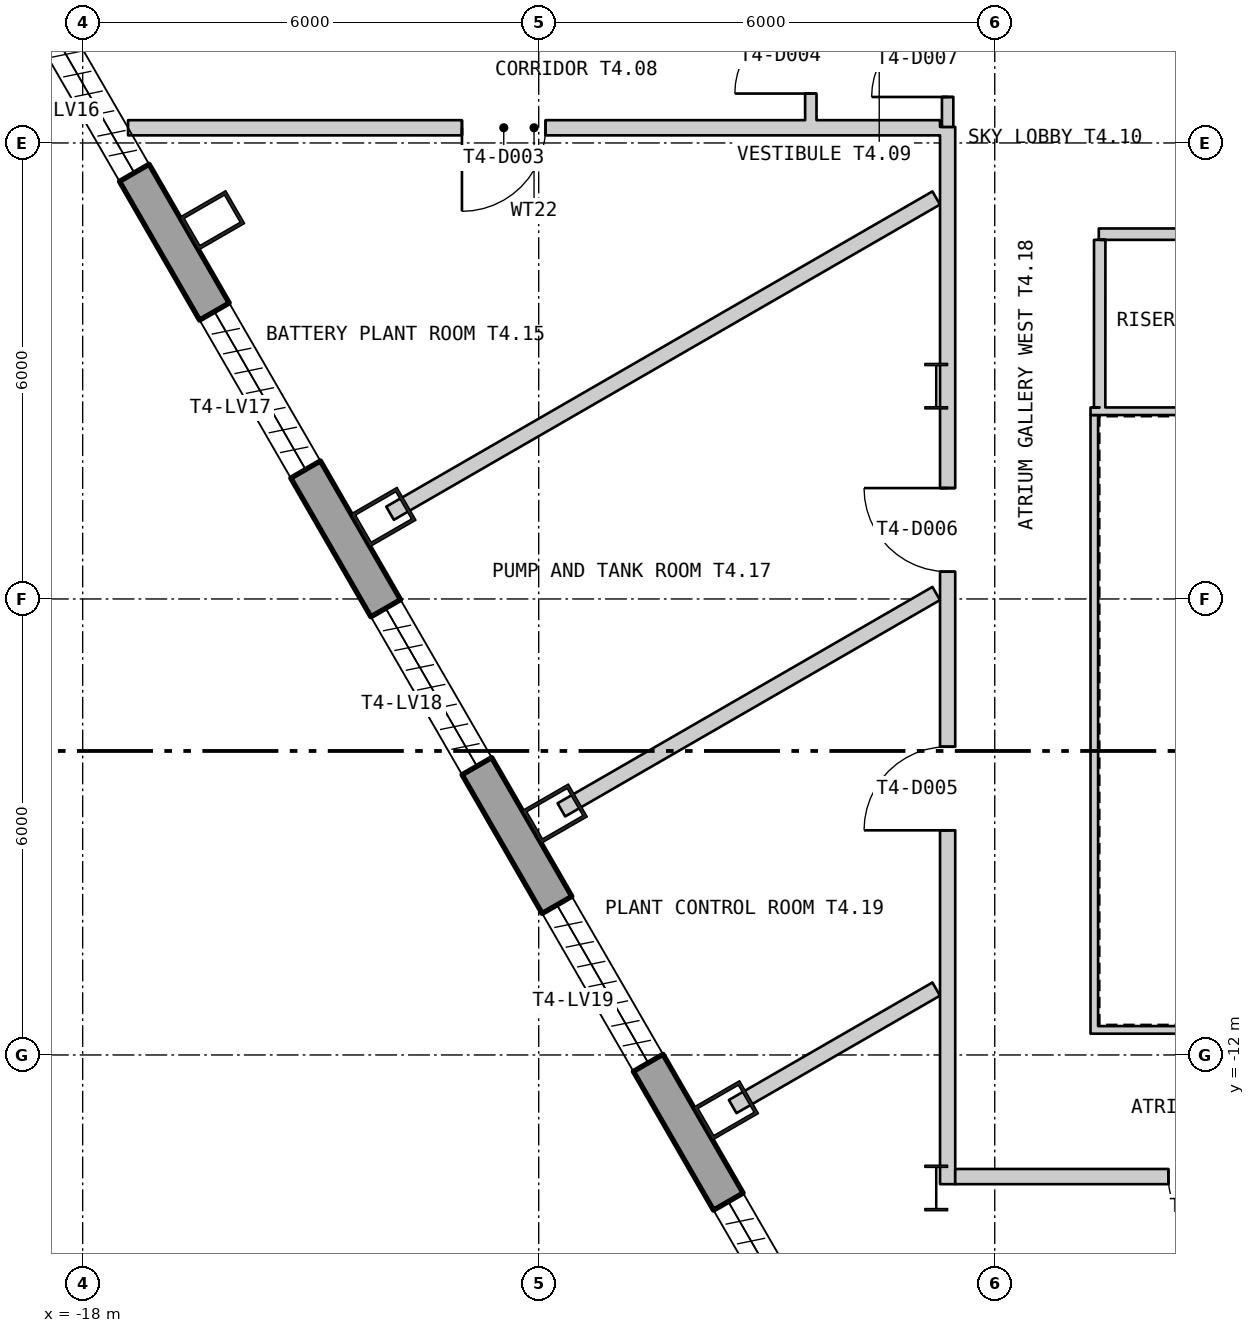
"""IFC4 building model, lengths in metres.
Left out: names, types, materials, properties, quantities, classifications, styles, units other than length and angle.
Written with IfcOpenShell. Run it as: python <this file> out.ifc"""

import sys

from ifc_helpers import new_model, si_unit, direction, frame, frame_2d, origin, origin_2d, place, context, subcontext, project, spatial, polyline, rectangle, hollow_rectangle, i_section, outline, extrude, element, fill, save


model = new_model("IFC4")
c1 = context("Model", 3, precision=1e-05, world=origin(), true_north=direction((0.0, 1.0)))
c2 = subcontext(c1, "Body", "Model", "MODEL_VIEW")
j1 = project(units=[si_unit("LENGTHUNIT", "METRE"), si_unit("PLANEANGLEUNIT", "RADIAN")], contexts=[c1])
p1 = place(None, origin())
s1 = spatial("IfcSite", under=j1, at=p1, CompositionType="ELEMENT")
p2 = place(p1, origin())
s2 = spatial("IfcBuilding", under=s1, at=p2, CompositionType="ELEMENT")
p3 = place(p2, frame((0.0, 0.0, 239.4)))
s3 = spatial("IfcBuildingStorey", under=s2, at=p3, CompositionType="ELEMENT", Elevation=239.4)
for number, where, z_axis, x_axis in (
    (1, (-16.296, -1.018, 0.0), (0.0, 0.0, 1.0), (0.5, -0.866, 0.0)),
    (2, (-14.042, -4.922, 0.0), (0.0, 0.0, 1.0), (0.5, -0.866, 0.0)),
    (3, (-11.788, -8.825, 0.0), (0.0, 0.0, 1.0), (0.5, -0.866, 0.0)),
    (4, (-9.535, -12.729, 0.0), (0.0, 0.0, 1.0), (0.5, -0.866, 0.0)),
):
    element("IfcColumn", number, at=place(p3, frame(where, z_axis=z_axis, x_axis=x_axis)), inside=s3, PredefinedType="COLUMN", context=c2, shape_type="SweptSolid", body=[
        extrude(hollow_rectangle(XDim=0.5, YDim=0.7, WallThickness=0.045, at=origin_2d()), origin(), (0.0, 0.0, 1.0), 6.0),
    ])
for number, where, z_axis, x_axis in (
    (5, (-6.77, -3.2, 0.0), (0.0, 0.0, 1.0), (1.0, 0.0, 0.0)),
    (6, (-6.77, -13.75, 0.0), (0.0, 0.0, 1.0), (1.0, 0.0, 0.0)),
):
    element("IfcColumn", number, at=place(p3, frame(where, z_axis=z_axis, x_axis=x_axis)), inside=s3, PredefinedType="COLUMN", context=c2, shape_type="SweptSolid", body=[
        extrude(i_section(OverallWidth=0.3, OverallDepth=0.6, WebThickness=0.015, FlangeThickness=0.03, at=origin_2d()), origin(), (0.0, 0.0, 1.0), 6.0),
    ])
p4 = place(p3, frame((-25.975, 14.597, -0.18), z_axis=(0.0, 0.0, 1.0), x_axis=(0.499999764979, -0.866025539474, 0.0)))
e7 = element("IfcWall", 7, at=p4, inside=s3, PredefinedType="SOLIDWALL", context=c2, shape_type="SweptSolid", body=[
    extrude(outline(polyline([(-0.13, -0.225), (45.87, -0.225), (45.61, 0.225), (0.13, 0.225), (-0.13, -0.225)])), origin(), (0.0, 0.0, 1.0), 6.0),
])
p5 = place(p4, frame((1.424, 0.0, 1.38)))
e8 = element("IfcOpeningElement", 8, at=p5, cuts=e7, PredefinedType="OPENING", context=c2, shape_type="SweptSolid", body=[
    extrude(rectangle(XDim=2.4, YDim=3.6, at=frame_2d((1.2, 1.8))), frame((0.0, 0.235, 0.0), z_axis=(0.0, -1.0, 0.0), x_axis=(1.0, 0.0, 0.0)), (0.0, 0.0, 1.0), 0.47),
])
p6 = place(p4, frame((5.893, 0.0, 1.38)))
e9 = element("IfcOpeningElement", 9, at=p6, cuts=e7, PredefinedType="OPENING", context=c2, shape_type="SweptSolid", body=[
    extrude(rectangle(XDim=2.4, YDim=3.6, at=frame_2d((1.2, 1.8))), frame((0.0, 0.235, 0.0), z_axis=(0.0, -1.0, 0.0), x_axis=(1.0, 0.0, 0.0)), (0.0, 0.0, 1.0), 0.47),
])
p7 = place(p4, frame((10.401, 0.0, 1.38)))
e10 = element("IfcOpeningElement", 10, at=p7, cuts=e7, PredefinedType="OPENING", context=c2, shape_type="SweptSolid", body=[
    extrude(rectangle(XDim=2.4, YDim=3.6, at=frame_2d((1.2, 1.8))), frame((0.0, 0.235, 0.0), z_axis=(0.0, -1.0, 0.0), x_axis=(1.0, 0.0, 0.0)), (0.0, 0.0, 1.0), 0.47),
])
p8 = place(p4, frame((14.909, 0.0, 1.38)))
e11 = element("IfcOpeningElement", 11, at=p8, cuts=e7, PredefinedType="OPENING", context=c2, shape_type="SweptSolid", body=[
    extrude(rectangle(XDim=2.4, YDim=3.6, at=frame_2d((1.2, 1.8))), frame((0.0, 0.235, 0.0), z_axis=(0.0, -1.0, 0.0), x_axis=(1.0, 0.0, 0.0)), (0.0, 0.0, 1.0), 0.47),
])
p9 = place(p4, frame((19.416, 0.0, 1.38)))
e12 = element("IfcOpeningElement", 12, at=p9, cuts=e7, PredefinedType="OPENING", context=c2, shape_type="SweptSolid", body=[
    extrude(rectangle(XDim=2.4, YDim=3.6, at=frame_2d((1.2, 1.8))), frame((0.0, 0.235, 0.0), z_axis=(0.0, -1.0, 0.0), x_axis=(1.0, 0.0, 0.0)), (0.0, 0.0, 1.0), 0.47),
])
p10 = place(p4, frame((23.924, 0.0, 1.38)))
e13 = element("IfcOpeningElement", 13, at=p10, cuts=e7, PredefinedType="OPENING", context=c2, shape_type="SweptSolid", body=[
    extrude(rectangle(XDim=2.4, YDim=3.6, at=frame_2d((1.2, 1.8))), frame((0.0, 0.235, 0.0), z_axis=(0.0, -1.0, 0.0), x_axis=(1.0, 0.0, 0.0)), (0.0, 0.0, 1.0), 0.47),
])
p11 = place(p4, frame((28.431, 0.0, 1.38)))
e14 = element("IfcOpeningElement", 14, at=p11, cuts=e7, PredefinedType="OPENING", context=c2, shape_type="SweptSolid", body=[
    extrude(rectangle(XDim=2.4, YDim=3.6, at=frame_2d((1.2, 1.8))), frame((0.0, 0.235, 0.0), z_axis=(0.0, -1.0, 0.0), x_axis=(1.0, 0.0, 0.0)), (0.0, 0.0, 1.0), 0.47),
])
p12 = place(p4, frame((32.939, 0.0, 1.38)))
e15 = element("IfcOpeningElement", 15, at=p12, cuts=e7, PredefinedType="OPENING", context=c2, shape_type="SweptSolid", body=[
    extrude(rectangle(XDim=2.4, YDim=3.6, at=frame_2d((1.2, 1.8))), frame((0.0, 0.235, 0.0), z_axis=(0.0, -1.0, 0.0), x_axis=(1.0, 0.0, 0.0)), (0.0, 0.0, 1.0), 0.47),
])
p13 = place(p4, frame((37.447, 0.0, 1.38)))
e16 = element("IfcOpeningElement", 16, at=p13, cuts=e7, PredefinedType="OPENING", context=c2, shape_type="SweptSolid", body=[
    extrude(rectangle(XDim=2.4, YDim=3.6, at=frame_2d((1.2, 1.8))), frame((0.0, 0.235, 0.0), z_axis=(0.0, -1.0, 0.0), x_axis=(1.0, 0.0, 0.0)), (0.0, 0.0, 1.0), 0.47),
])
p14 = place(p4, frame((41.916, 0.0, 1.38)))
e17 = element("IfcOpeningElement", 17, at=p14, cuts=e7, PredefinedType="OPENING", context=c2, shape_type="SweptSolid", body=[
    extrude(rectangle(XDim=2.4, YDim=3.6, at=frame_2d((1.2, 1.8))), frame((0.0, 0.235, 0.0), z_axis=(0.0, -1.0, 0.0), x_axis=(1.0, 0.0, 0.0)), (0.0, 0.0, 1.0), 0.47),
])
for number, where, z_axis, x_axis in (
    (18, (-4.74, -11.67, 0.0), (0.0, 0.0, 1.0), (1.0, 0.0, 0.0)),
    (19, (4.74, -3.53, 0.0), (0.0, 0.0, 1.0), (-1.0, 0.0, 0.0)),
):
    element("IfcWall", number, at=place(p3, frame(where, z_axis=z_axis, x_axis=x_axis)), inside=s3, PredefinedType="PARTITIONING", context=c2, shape_type="SweptSolid", body=[
        extrude(rectangle(XDim=9.48, YDim=0.1, at=frame_2d((4.74, 0.0))), origin(), (0.0, 0.0, 1.0), 5.8),
    ])
p15 = place(p3, frame((-4.69, -3.58, 0.0), z_axis=(0.0, 0.0, 1.0), x_axis=(0.0, -1.0, 0.0)))
e20 = element("IfcWall", 20, at=p15, inside=s3, PredefinedType="PARTITIONING", context=c2, shape_type="SweptSolid", body=[
    extrude(rectangle(XDim=8.04, YDim=0.1, at=frame_2d((4.02, 0.0))), origin(), (0.0, 0.0, 1.0), 5.8),
])
p16 = place(p3, frame((-17.403, 0.2, 0.0), z_axis=(0.0, 0.0, 1.0), x_axis=(1.0, 0.0, 0.0)))
e21 = element("IfcWall", 21, at=p16, inside=s3, PredefinedType="PARTITIONING", context=c2, shape_type="SweptSolid", body=[
    extrude(rectangle(XDim=10.683, YDim=0.2, at=frame_2d((5.341, 0.0))), origin(), (0.0, 0.0, 1.0), 5.8),
])
p17 = place(p16, frame((4.393, 0.0, 0.0)))
e22 = element("IfcOpeningElement", 22, at=p17, cuts=e21, PredefinedType="OPENING", context=c2, shape_type="SweptSolid", body=[
    extrude(rectangle(XDim=1.1, YDim=2.1, at=frame_2d((0.55, 1.05))), frame((0.0, 0.11, 0.0), z_axis=(0.0, -1.0, 0.0), x_axis=(1.0, 0.0, 0.0)), (0.0, 0.0, 1.0), 0.22),
])
p18 = place(p3, frame((-13.956, -4.872, 0.0), z_axis=(0.0, 0.0, 1.0), x_axis=(0.866069187523, 0.499924156672, 0.0)))
e23 = element("IfcWall", 23, at=p18, inside=s3, PredefinedType="PARTITIONING", context=c2, shape_type="SweptSolid", body=[
    extrude(rectangle(XDim=8.297, YDim=0.2, at=frame_2d((4.149, 0.0))), origin(), (0.0, 0.0, 1.0), 5.8),
])
p19 = place(p3, frame((-11.702, -8.775, 0.0), z_axis=(0.0, 0.0, 1.0), x_axis=(0.866062775822, 0.499935264145, 0.0)))
e24 = element("IfcWall", 24, at=p19, inside=s3, PredefinedType="PARTITIONING", context=c2, shape_type="SweptSolid", body=[
    extrude(rectangle(XDim=5.695, YDim=0.2, at=frame_2d((2.847, 0.0))), origin(), (0.0, 0.0, 1.0), 5.8),
])
p20 = place(p3, frame((-9.448, -12.679, 0.0), z_axis=(0.0, 0.0, 1.0), x_axis=(0.866045570776, 0.499965068118, 0.0)))
e25 = element("IfcWall", 25, at=p20, inside=s3, PredefinedType="PARTITIONING", context=c2, shape_type="SweptSolid", body=[
    extrude(rectangle(XDim=3.092, YDim=0.2, at=frame_2d((1.546, 0.0))), origin(), (0.0, 0.0, 1.0), 5.8),
])
p21 = place(p3, frame((-8.42, 0.3, 0.0), z_axis=(0.0, 0.0, 1.0), x_axis=(0.0, 1.0, 0.0)))
e26 = element("IfcWall", 26, at=p21, inside=s3, PredefinedType="PARTITIONING", context=c2, shape_type="SweptSolid", body=[
    extrude(rectangle(XDim=1.7, YDim=0.15, at=frame_2d((0.85, 0.0))), origin(), (0.0, 0.0, 1.0), 5.8),
])
p22 = place(p21, frame((0.35, 0.0, 0.0)))
e27 = element("IfcOpeningElement", 27, at=p22, cuts=e26, PredefinedType="OPENING", context=c2, shape_type="SweptSolid", body=[
    extrude(rectangle(XDim=1.0, YDim=2.1, at=frame_2d((0.5, 1.05))), frame((0.0, 0.085, 0.0), z_axis=(0.0, -1.0, 0.0), x_axis=(1.0, 0.0, 0.0)), (0.0, 0.0, 1.0), 0.17),
])
p23 = place(p3, frame((-6.62, -13.7, 0.0), z_axis=(0.0, 0.0, 1.0), x_axis=(0.0, 1.0, 0.0)))
e28 = element("IfcWall", 28, at=p23, inside=s3, PredefinedType="PARTITIONING", context=c2, shape_type="SweptSolid", body=[
    extrude(rectangle(XDim=10.5, YDim=0.2, at=frame_2d((5.25, 0.0))), origin(), (0.0, 0.0, 1.0), 5.21),
])
p24 = place(p23, frame((4.656, 0.0, 0.0)))
e29 = element("IfcOpeningElement", 29, at=p24, cuts=e28, PredefinedType="OPENING", context=c2, shape_type="SweptSolid", body=[
    extrude(rectangle(XDim=1.1, YDim=2.1, at=frame_2d((0.55, 1.05))), frame((0.0, 0.11, 0.0), z_axis=(0.0, -1.0, 0.0), x_axis=(1.0, 0.0, 0.0)), (0.0, 0.0, 1.0), 0.22),
])
p25 = place(p23, frame((8.059, 0.0, 0.0)))
e30 = element("IfcOpeningElement", 30, at=p25, cuts=e28, PredefinedType="OPENING", context=c2, shape_type="SweptSolid", body=[
    extrude(rectangle(XDim=1.1, YDim=2.1, at=frame_2d((0.55, 1.05))), frame((0.0, 0.11, 0.0), z_axis=(0.0, -1.0, 0.0), x_axis=(1.0, 0.0, 0.0)), (0.0, 0.0, 1.0), 0.22),
])
p26 = place(p3, frame((-6.62, -3.2, 0.0), z_axis=(0.0, 0.0, 1.0), x_axis=(0.0, 1.0, 0.0)))
e31 = element("IfcWall", 31, at=p26, inside=s3, PredefinedType="PARTITIONING", context=c2, shape_type="SweptSolid", body=[
    extrude(rectangle(XDim=3.411, YDim=0.2, at=frame_2d((1.706, 0.0))), origin(), (0.0, 0.0, 1.0), 5.8),
])
p27 = place(p3, frame((-6.62, 0.211, 0.0), z_axis=(0.0, 0.0, 1.0), x_axis=(0.0, 1.0, 0.0)))
e32 = element("IfcWall", 32, at=p27, inside=s3, PredefinedType="PARTITIONING", context=c2, shape_type="SweptSolid", body=[
    extrude(rectangle(XDim=1.789, YDim=0.15, at=frame_2d((0.894, 0.0))), origin(), (0.0, 0.0, 1.0), 5.8),
])
p28 = place(p27, frame((0.394, 0.0, 0.0)))
e33 = element("IfcOpeningElement", 33, at=p28, cuts=e32, PredefinedType="OPENING", context=c2, shape_type="SweptSolid", body=[
    extrude(rectangle(XDim=1.0, YDim=2.1, at=frame_2d((0.5, 1.05))), frame((0.0, 0.085, 0.0), z_axis=(0.0, -1.0, 0.0), x_axis=(1.0, 0.0, 0.0)), (0.0, 0.0, 1.0), 0.17),
])
p29 = place(p3, frame((-6.52, -13.6, 0.0), z_axis=(0.0, 0.0, 1.0), x_axis=(1.0, 0.0, 0.0)))
e34 = element("IfcWall", 34, at=p29, inside=s3, PredefinedType="PARTITIONING", context=c2, shape_type="SweptSolid", body=[
    extrude(rectangle(XDim=4.82, YDim=0.2, at=frame_2d((2.41, 0.0))), origin(), (0.0, 0.0, 1.0), 5.01),
])
p30 = place(p29, frame((2.804, 0.0, 0.0)))
e35 = element("IfcOpeningElement", 35, at=p30, cuts=e34, PredefinedType="OPENING", context=c2, shape_type="SweptSolid", body=[
    extrude(rectangle(XDim=1.1, YDim=2.1, at=frame_2d((0.55, 1.05))), frame((0.0, 0.11, 0.0), z_axis=(0.0, -1.0, 0.0), x_axis=(1.0, 0.0, 0.0)), (0.0, 0.0, 1.0), 0.22),
])
p31 = place(p3, frame((-4.631, -1.2, 0.0), z_axis=(0.0, 0.0, 1.0), x_axis=(1.0, 0.0, 0.0)))
e36 = element("IfcWall", 36, at=p31, inside=s3, PredefinedType="PARTITIONING", context=c2, shape_type="SweptSolid", body=[
    extrude(rectangle(XDim=4.62, YDim=0.15, at=frame_2d((2.31, 0.0))), origin(), (0.0, 0.0, 1.0), 5.8),
])
p32 = place(p31, frame((2.583, 0.0, 0.0)))
e37 = element("IfcOpeningElement", 37, at=p32, cuts=e36, PredefinedType="OPENING", context=c2, shape_type="SweptSolid", body=[
    extrude(rectangle(XDim=0.9, YDim=2.1, at=frame_2d((0.45, 1.05))), frame((0.0, 0.085, 0.0), z_axis=(0.0, -1.0, 0.0), x_axis=(1.0, 0.0, 0.0)), (0.0, 0.0, 1.0), 0.17),
])
p33 = place(p3, frame((-4.62, -3.48, 0.0), z_axis=(0.0, 0.0, 1.0), x_axis=(0.000453514693, 0.999999897162, 0.0)))
e38 = element("IfcWall", 38, at=p33, inside=s3, PredefinedType="PARTITIONING", context=c2, shape_type="SweptSolid", body=[
    extrude(rectangle(XDim=2.205, YDim=0.15, at=frame_2d((1.103, 0.0))), origin(), (0.0, 0.0, 1.0), 5.8),
])
p34 = place(p17, origin())
e39 = element("IfcDoor", 39, at=p34, inside=s3, OperationType="SINGLE_SWING_LEFT", PredefinedType="DOOR", context=c2, shape_type="SweptSolid", body=[
    extrude(rectangle(XDim=1.1, YDim=2.1, at=frame_2d((0.55, 1.05))), frame((0.0, 0.025, 0.0), z_axis=(0.0, -1.0, 0.0), x_axis=(1.0, 0.0, 0.0)), (0.0, 0.0, 1.0), 0.05),
])
fill(e22, e39)
p35 = place(p22, origin())
e40 = element("IfcDoor", 40, at=p35, inside=s3, OperationType="SINGLE_SWING_RIGHT", PredefinedType="DOOR", context=c2, shape_type="SweptSolid", body=[
    extrude(rectangle(XDim=1.0, YDim=2.1, at=frame_2d((0.5, 1.05))), frame((0.0, 0.025, 0.0), z_axis=(0.0, -1.0, 0.0), x_axis=(1.0, 0.0, 0.0)), (0.0, 0.0, 1.0), 0.05),
])
fill(e27, e40)
p36 = place(p24, origin())
e41 = element("IfcDoor", 41, at=p36, inside=s3, OperationType="SINGLE_SWING_RIGHT", PredefinedType="DOOR", context=c2, shape_type="SweptSolid", body=[
    extrude(rectangle(XDim=1.1, YDim=2.1, at=frame_2d((0.55, 1.05))), frame((0.0, 0.025, 0.0), z_axis=(0.0, -1.0, 0.0), x_axis=(1.0, 0.0, 0.0)), (0.0, 0.0, 1.0), 0.05),
])
fill(e29, e41)
p37 = place(p25, origin())
e42 = element("IfcDoor", 42, at=p37, inside=s3, OperationType="SINGLE_SWING_LEFT", PredefinedType="DOOR", context=c2, shape_type="SweptSolid", body=[
    extrude(rectangle(XDim=1.1, YDim=2.1, at=frame_2d((0.55, 1.05))), frame((0.0, 0.025, 0.0), z_axis=(0.0, -1.0, 0.0), x_axis=(1.0, 0.0, 0.0)), (0.0, 0.0, 1.0), 0.05),
])
fill(e30, e42)
p38 = place(p28, origin())
e43 = element("IfcDoor", 43, at=p38, inside=s3, OperationType="SINGLE_SWING_RIGHT", PredefinedType="DOOR", context=c2, shape_type="SweptSolid", body=[
    extrude(rectangle(XDim=1.0, YDim=2.1, at=frame_2d((0.5, 1.05))), frame((0.0, 0.025, 0.0), z_axis=(0.0, -1.0, 0.0), x_axis=(1.0, 0.0, 0.0)), (0.0, 0.0, 1.0), 0.05),
])
fill(e33, e43)
p39 = place(p30, origin())
e44 = element("IfcDoor", 44, at=p39, inside=s3, OperationType="SINGLE_SWING_RIGHT", PredefinedType="DOOR", context=c2, shape_type="SweptSolid", body=[
    extrude(rectangle(XDim=1.1, YDim=2.1, at=frame_2d((0.55, 1.05))), frame((0.0, 0.025, 0.0), z_axis=(0.0, -1.0, 0.0), x_axis=(1.0, 0.0, 0.0)), (0.0, 0.0, 1.0), 0.05),
])
fill(e35, e44)
save(model, sys.argv[1])
